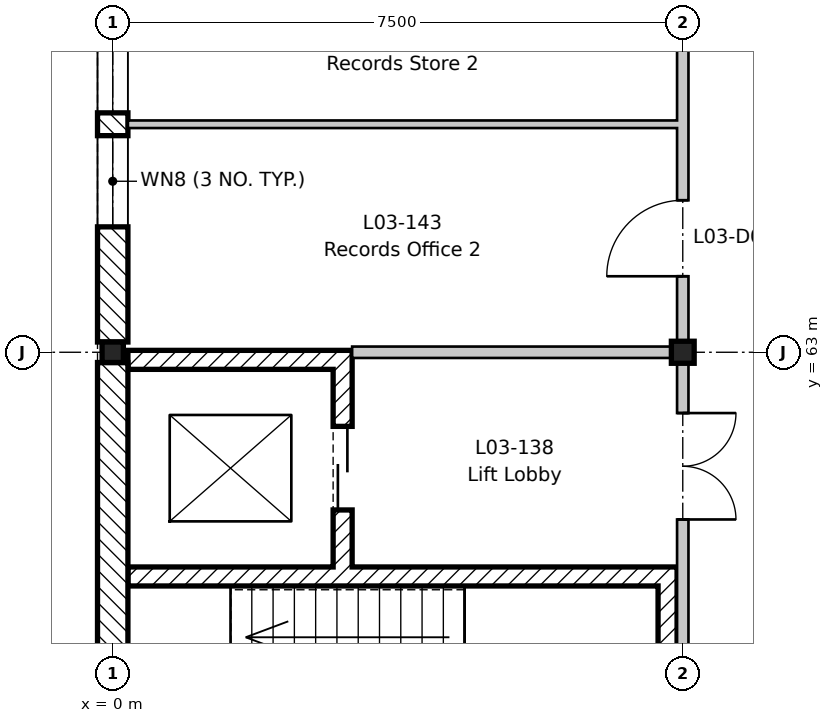
"""IFC4 building model, lengths in metres.
Left out: names, types, materials, properties, quantities, classifications, styles, units other than length and angle.
Written with IfcOpenShell. Run it as: python <this file> out.ifc"""

import sys

from ifc_helpers import new_model, si_unit, direction, frame, frame_2d, origin, origin_2d, place, context, subcontext, project, spatial, rectangle, i_section, extrude, element, fill, save


model = new_model("IFC4")
c1 = context("Model", 3, precision=1e-05, world=origin(), true_north=direction((0.0, 1.0)))
c2 = subcontext(c1, "Body", "Model", "MODEL_VIEW")
j1 = project(units=[si_unit("LENGTHUNIT", "METRE"), si_unit("PLANEANGLEUNIT", "RADIAN")], contexts=[c1])
p1 = place(None, origin())
s1 = spatial("IfcSite", under=j1, at=p1, CompositionType="ELEMENT")
p2 = place(p1, origin())
s2 = spatial("IfcBuilding", under=s1, at=p2, CompositionType="ELEMENT")
p3 = place(p2, frame((0.0, 0.0, 14.4)))
s3 = spatial("IfcBuildingStorey", under=s2, at=p3, CompositionType="ELEMENT", Elevation=14.4)
p4 = place(p3, frame((0.0, 63.0, -0.2), z_axis=(0.0, 0.0, 1.0), x_axis=(1.0, 0.0, 0.0)))
e1 = element("IfcColumn", 1, at=p4, inside=s3, PredefinedType="COLUMN", context=c2, shape_type="SweptSolid", body=[
    extrude(i_section(OverallWidth=0.28, OverallDepth=0.27, WebThickness=0.008, FlangeThickness=0.013, FilletRadius=0.024, at=origin_2d()), origin(), (0.0, 0.0, 1.0), 4.2),
])
p5 = place(p3, frame((7.5, 63.0, -0.2), z_axis=(0.0, 0.0, 1.0), x_axis=(1.0, 0.0, 0.0)))
e2 = element("IfcColumn", 2, at=p5, inside=s3, PredefinedType="COLUMN", context=c2, shape_type="SweptSolid", body=[
    extrude(i_section(OverallWidth=0.3, OverallDepth=0.29, WebThickness=0.009, FlangeThickness=0.014, FilletRadius=0.027, at=origin_2d()), origin(), (0.0, 0.0, 1.0), 4.2),
])
p6 = place(p3, frame((0.2, 60.05, 0.0), z_axis=(0.0, 0.0, 1.0), x_axis=(1.0, 0.0, 0.0)))
e3 = element("IfcWall", 3, at=p6, inside=s3, PredefinedType="SHEAR", context=c2, shape_type="SweptSolid", body=[
    extrude(rectangle(XDim=7.225, YDim=0.25, at=frame_2d((3.613, 0.0))), origin(), (0.0, 0.0, 1.0), 4.0),
])
p7 = place(p3, frame((7.3, 57.075, 0.0), z_axis=(0.0, 0.0, 1.0), x_axis=(0.0, 1.0, 0.0)))
e4 = element("IfcWall", 4, at=p7, inside=s3, PredefinedType="SHEAR", context=c2, shape_type="SweptSolid", body=[
    extrude(rectangle(XDim=2.85, YDim=0.25, at=frame_2d((1.425, 0.0))), origin(), (0.0, 0.0, 1.0), 4.0),
])
p8 = place(p3, frame((3.025, 60.175, 0.0), z_axis=(0.0, 0.0, 1.0), x_axis=(0.0, 1.0, 0.0)))
e5 = element("IfcWall", 5, at=p8, inside=s3, PredefinedType="SHEAR", context=c2, shape_type="SweptSolid", body=[
    extrude(rectangle(XDim=2.6, YDim=0.25, at=frame_2d((1.3, 0.0))), origin(), (0.0, 0.0, 1.0), 4.0),
])
p9 = place(p8, frame((0.75, 0.0, 0.0)))
e6 = element("IfcOpeningElement", 6, at=p9, cuts=e5, PredefinedType="OPENING", context=c2, shape_type="SweptSolid", body=[
    extrude(rectangle(XDim=1.1, YDim=2.1, at=frame_2d((0.55, 1.05))), frame((0.0, 0.135, 0.0), z_axis=(0.0, -1.0, 0.0), x_axis=(1.0, 0.0, 0.0)), (0.0, 0.0, 1.0), 0.27),
])
p10 = place(p3, frame((0.2, 62.9, 0.0), z_axis=(0.0, 0.0, 1.0), x_axis=(1.0, 0.0, 0.0)))
e7 = element("IfcWall", 7, at=p10, inside=s3, PredefinedType="SHEAR", context=c2, shape_type="SweptSolid", body=[
    extrude(rectangle(XDim=2.95, YDim=0.25, at=frame_2d((1.475, 0.0))), origin(), (0.0, 0.0, 1.0), 4.0),
])
p11 = place(p3, frame((0.0, 54.135, 0.0), z_axis=(0.0, 0.0, 1.0), x_axis=(0.0, 1.0, 0.0)))
e8 = element("IfcWall", 8, at=p11, inside=s3, PredefinedType="STANDARD", context=c2, shape_type="SweptSolid", body=[
    extrude(rectangle(XDim=8.73, YDim=0.4, at=frame_2d((4.365, 0.0))), origin(), (0.0, 0.0, 1.0), 3.6),
])
p12 = place(p3, frame((0.0, 63.135, 0.0), z_axis=(0.0, 0.0, 1.0), x_axis=(0.0, 1.0, 0.0)))
e9 = element("IfcWall", 9, at=p12, inside=s3, PredefinedType="STANDARD", context=c2, shape_type="SweptSolid", body=[
    extrude(rectangle(XDim=7.23, YDim=0.4, at=frame_2d((3.615, 0.0))), origin(), (0.0, 0.0, 1.0), 3.6),
])
p13 = place(p12, frame((1.515, 0.0, 0.6)))
e10 = element("IfcOpeningElement", 10, at=p13, cuts=e9, PredefinedType="OPENING", context=c2, shape_type="SweptSolid", body=[
    extrude(rectangle(XDim=1.2, YDim=2.7, at=frame_2d((0.6, 1.35))), frame((0.0, 0.21, 0.0), z_axis=(0.0, -1.0, 0.0), x_axis=(1.0, 0.0, 0.0)), (0.0, 0.0, 1.0), 0.42),
])
p14 = place(p12, frame((3.015, 0.0, 0.6)))
e11 = element("IfcOpeningElement", 11, at=p14, cuts=e9, PredefinedType="OPENING", context=c2, shape_type="SweptSolid", body=[
    extrude(rectangle(XDim=1.2, YDim=2.7, at=frame_2d((0.6, 1.35))), frame((0.0, 0.21, 0.0), z_axis=(0.0, -1.0, 0.0), x_axis=(1.0, 0.0, 0.0)), (0.0, 0.0, 1.0), 0.42),
])
p15 = place(p12, frame((4.515, 0.0, 0.6)))
e12 = element("IfcOpeningElement", 12, at=p15, cuts=e9, PredefinedType="OPENING", context=c2, shape_type="SweptSolid", body=[
    extrude(rectangle(XDim=1.2, YDim=2.7, at=frame_2d((0.6, 1.35))), frame((0.0, 0.21, 0.0), z_axis=(0.0, -1.0, 0.0), x_axis=(1.0, 0.0, 0.0)), (0.0, 0.0, 1.0), 0.42),
])
p16 = place(p3, frame((7.5, -8.8, 0.0), z_axis=(0.0, 0.0, 1.0), x_axis=(0.0, 1.0, 0.0)))
e13 = element("IfcWall", 13, at=p16, inside=s3, PredefinedType="PARTITIONING", context=c2, shape_type="SweptSolid", body=[
    extrude(rectangle(XDim=79.3, YDim=0.15, at=frame_2d((39.65, 0.0))), origin(), (0.0, 0.0, 1.0), 3.48),
])
p17 = place(p16, frame((18.8, 0.0, 0.0)))
e14 = element("IfcOpeningElement", 14, at=p17, cuts=e13, PredefinedType="OPENING", context=c2, shape_type="SweptSolid", body=[
    extrude(rectangle(XDim=1.0, YDim=2.1, at=frame_2d((0.5, 1.05))), frame((0.0, 0.085, 0.0), z_axis=(0.0, -1.0, 0.0), x_axis=(1.0, 0.0, 0.0)), (0.0, 0.0, 1.0), 0.17),
])
p18 = place(p16, frame((23.3, 0.0, 0.0)))
e15 = element("IfcOpeningElement", 15, at=p18, cuts=e13, PredefinedType="OPENING", context=c2, shape_type="SweptSolid", body=[
    extrude(rectangle(XDim=1.0, YDim=2.1, at=frame_2d((0.5, 1.05))), frame((0.0, 0.085, 0.0), z_axis=(0.0, -1.0, 0.0), x_axis=(1.0, 0.0, 0.0)), (0.0, 0.0, 1.0), 0.17),
])
p19 = place(p16, frame((27.8, 0.0, 0.0)))
e16 = element("IfcOpeningElement", 16, at=p19, cuts=e13, PredefinedType="OPENING", context=c2, shape_type="SweptSolid", body=[
    extrude(rectangle(XDim=1.0, YDim=2.1, at=frame_2d((0.5, 1.05))), frame((0.0, 0.085, 0.0), z_axis=(0.0, -1.0, 0.0), x_axis=(1.0, 0.0, 0.0)), (0.0, 0.0, 1.0), 0.17),
])
p20 = place(p16, frame((30.8, 0.0, 0.0)))
e17 = element("IfcOpeningElement", 17, at=p20, cuts=e13, PredefinedType="OPENING", context=c2, shape_type="SweptSolid", body=[
    extrude(rectangle(XDim=1.0, YDim=2.1, at=frame_2d((0.5, 1.05))), frame((0.0, 0.085, 0.0), z_axis=(0.0, -1.0, 0.0), x_axis=(1.0, 0.0, 0.0)), (0.0, 0.0, 1.0), 0.17),
])
p21 = place(p16, frame((33.8, 0.0, 0.0)))
e18 = element("IfcOpeningElement", 18, at=p21, cuts=e13, PredefinedType="OPENING", context=c2, shape_type="SweptSolid", body=[
    extrude(rectangle(XDim=1.0, YDim=2.1, at=frame_2d((0.5, 1.05))), frame((0.0, 0.085, 0.0), z_axis=(0.0, -1.0, 0.0), x_axis=(1.0, 0.0, 0.0)), (0.0, 0.0, 1.0), 0.17),
])
p22 = place(p16, frame((47.3, 0.0, 0.0)))
e19 = element("IfcOpeningElement", 19, at=p22, cuts=e13, PredefinedType="OPENING", context=c2, shape_type="SweptSolid", body=[
    extrude(rectangle(XDim=1.0, YDim=2.1, at=frame_2d((0.5, 1.05))), frame((0.0, 0.085, 0.0), z_axis=(0.0, -1.0, 0.0), x_axis=(1.0, 0.0, 0.0)), (0.0, 0.0, 1.0), 0.17),
])
p23 = place(p16, frame((51.8, 0.0, 0.0)))
e20 = element("IfcOpeningElement", 20, at=p23, cuts=e13, PredefinedType="OPENING", context=c2, shape_type="SweptSolid", body=[
    extrude(rectangle(XDim=1.0, YDim=2.1, at=frame_2d((0.5, 1.05))), frame((0.0, 0.085, 0.0), z_axis=(0.0, -1.0, 0.0), x_axis=(1.0, 0.0, 0.0)), (0.0, 0.0, 1.0), 0.17),
])
p24 = place(p16, frame((54.8, 0.0, 0.0)))
e21 = element("IfcOpeningElement", 21, at=p24, cuts=e13, PredefinedType="OPENING", context=c2, shape_type="SweptSolid", body=[
    extrude(rectangle(XDim=1.0, YDim=2.1, at=frame_2d((0.5, 1.05))), frame((0.0, 0.085, 0.0), z_axis=(0.0, -1.0, 0.0), x_axis=(1.0, 0.0, 0.0)), (0.0, 0.0, 1.0), 0.17),
])
p25 = place(p16, frame((57.8, 0.0, 0.0)))
e22 = element("IfcOpeningElement", 22, at=p25, cuts=e13, PredefinedType="OPENING", context=c2, shape_type="SweptSolid", body=[
    extrude(rectangle(XDim=1.0, YDim=2.1, at=frame_2d((0.5, 1.05))), frame((0.0, 0.085, 0.0), z_axis=(0.0, -1.0, 0.0), x_axis=(1.0, 0.0, 0.0)), (0.0, 0.0, 1.0), 0.17),
])
p26 = place(p16, frame((60.8, 0.0, 0.0)))
e23 = element("IfcOpeningElement", 23, at=p26, cuts=e13, PredefinedType="OPENING", context=c2, shape_type="SweptSolid", body=[
    extrude(rectangle(XDim=1.0, YDim=2.1, at=frame_2d((0.5, 1.05))), frame((0.0, 0.085, 0.0), z_axis=(0.0, -1.0, 0.0), x_axis=(1.0, 0.0, 0.0)), (0.0, 0.0, 1.0), 0.17),
])
p27 = place(p16, frame((12.6, 0.0, 0.0)))
e24 = element("IfcOpeningElement", 24, at=p27, cuts=e13, PredefinedType="OPENING", context=c2, shape_type="SweptSolid", body=[
    extrude(rectangle(XDim=1.4, YDim=2.1, at=frame_2d((0.7, 1.05))), frame((0.0, 0.085, 0.0), z_axis=(0.0, -1.0, 0.0), x_axis=(1.0, 0.0, 0.0)), (0.0, 0.0, 1.0), 0.17),
])
p28 = place(p16, frame((3.6, 0.0, 0.0)))
e25 = element("IfcOpeningElement", 25, at=p28, cuts=e13, PredefinedType="OPENING", context=c2, shape_type="SweptSolid", body=[
    extrude(rectangle(XDim=1.4, YDim=2.1, at=frame_2d((0.7, 1.05))), frame((0.0, 0.085, 0.0), z_axis=(0.0, -1.0, 0.0), x_axis=(1.0, 0.0, 0.0)), (0.0, 0.0, 1.0), 0.17),
])
p29 = place(p16, frame((63.55, 0.0, 0.0)))
e26 = element("IfcOpeningElement", 26, at=p29, cuts=e13, PredefinedType="OPENING", context=c2, shape_type="SweptSolid", body=[
    extrude(rectangle(XDim=1.4, YDim=2.1, at=frame_2d((0.7, 1.05))), frame((0.0, 0.085, 0.0), z_axis=(0.0, -1.0, 0.0), x_axis=(1.0, 0.0, 0.0)), (0.0, 0.0, 1.0), 0.17),
])
p30 = place(p16, frame((69.6, 0.0, 0.0)))
e27 = element("IfcOpeningElement", 27, at=p30, cuts=e13, PredefinedType="OPENING", context=c2, shape_type="SweptSolid", body=[
    extrude(rectangle(XDim=1.4, YDim=2.1, at=frame_2d((0.7, 1.05))), frame((0.0, 0.085, 0.0), z_axis=(0.0, -1.0, 0.0), x_axis=(1.0, 0.0, 0.0)), (0.0, 0.0, 1.0), 0.17),
])
p31 = place(p16, frame((42.85, 0.0, 0.0)))
e28 = element("IfcOpeningElement", 28, at=p31, cuts=e13, PredefinedType="OPENING", context=c2, shape_type="SweptSolid", body=[
    extrude(rectangle(XDim=1.0, YDim=2.1, at=frame_2d((0.5, 1.05))), frame((0.0, 0.085, 0.0), z_axis=(0.0, -1.0, 0.0), x_axis=(1.0, 0.0, 0.0)), (0.0, 0.0, 1.0), 0.17),
])
p32 = place(p16, frame((36.55, 0.0, 0.0)))
e29 = element("IfcOpeningElement", 29, at=p32, cuts=e13, PredefinedType="OPENING", context=c2, shape_type="SweptSolid", body=[
    extrude(rectangle(XDim=1.4, YDim=2.1, at=frame_2d((0.7, 1.05))), frame((0.0, 0.085, 0.0), z_axis=(0.0, -1.0, 0.0), x_axis=(1.0, 0.0, 0.0)), (0.0, 0.0, 1.0), 0.17),
])
p33 = place(p16, frame((72.8, 0.0, 0.0)))
e30 = element("IfcOpeningElement", 30, at=p33, cuts=e13, PredefinedType="OPENING", context=c2, shape_type="SweptSolid", body=[
    extrude(rectangle(XDim=1.0, YDim=2.1, at=frame_2d((0.5, 1.05))), frame((0.0, 0.085, 0.0), z_axis=(0.0, -1.0, 0.0), x_axis=(1.0, 0.0, 0.0)), (0.0, 0.0, 1.0), 0.17),
])
p34 = place(p3, frame((3.15, 63.0, 0.0), z_axis=(0.0, 0.0, 1.0), x_axis=(1.0, 0.0, 0.0)))
e31 = element("IfcWall", 31, at=p34, inside=s3, PredefinedType="PARTITIONING", context=c2, shape_type="SweptSolid", body=[
    extrude(rectangle(XDim=4.275, YDim=0.15, at=frame_2d((2.138, 0.0))), origin(), (0.0, 0.0, 1.0), 3.65),
])
p35 = place(p3, frame((0.2, 66.0, 0.0), z_axis=(0.0, 0.0, 1.0), x_axis=(1.0, 0.0, 0.0)))
e32 = element("IfcWall", 32, at=p35, inside=s3, PredefinedType="PARTITIONING", context=c2, shape_type="SweptSolid", body=[
    extrude(rectangle(XDim=7.225, YDim=0.1, at=frame_2d((3.613, 0.0))), origin(), (0.0, 0.0, 1.0), 4.0),
])
p36 = place(p13, origin())
e33 = element("IfcWindow", 33, at=p36, inside=s3, PartitioningType="SINGLE_PANEL", PredefinedType="WINDOW", context=c2, shape_type="SweptSolid", body=[
    extrude(rectangle(XDim=1.2, YDim=2.7, at=frame_2d((0.6, 1.35))), frame((0.0, 0.03, 0.0), z_axis=(0.0, -1.0, 0.0), x_axis=(1.0, 0.0, 0.0)), (0.0, 0.0, 1.0), 0.06),
])
fill(e10, e33)
p37 = place(p14, origin())
e34 = element("IfcWindow", 34, at=p37, inside=s3, PartitioningType="SINGLE_PANEL", PredefinedType="WINDOW", context=c2, shape_type="SweptSolid", body=[
    extrude(rectangle(XDim=1.2, YDim=2.7, at=frame_2d((0.6, 1.35))), frame((0.0, 0.03, 0.0), z_axis=(0.0, -1.0, 0.0), x_axis=(1.0, 0.0, 0.0)), (0.0, 0.0, 1.0), 0.06),
])
fill(e11, e34)
p38 = place(p30, frame((1.4, 0.0, 0.0), z_axis=(0.0, 0.0, 1.0), x_axis=(-1.0, 0.0, 0.0)))
e35 = element("IfcDoor", 35, at=p38, inside=s3, OperationType="DOUBLE_DOOR_SINGLE_SWING", PredefinedType="DOOR", context=c2, shape_type="SweptSolid", body=[
    extrude(rectangle(XDim=1.4, YDim=2.1, at=frame_2d((0.7, 1.05))), frame((0.0, 0.025, 0.0), z_axis=(0.0, -1.0, 0.0), x_axis=(1.0, 0.0, 0.0)), (0.0, 0.0, 1.0), 0.05),
])
fill(e27, e35)
p39 = place(p33, origin())
e36 = element("IfcDoor", 36, at=p39, inside=s3, OperationType="SINGLE_SWING_LEFT", PredefinedType="DOOR", context=c2, shape_type="SweptSolid", body=[
    extrude(rectangle(XDim=1.0, YDim=2.1, at=frame_2d((0.5, 1.05))), frame((0.0, 0.025, 0.0), z_axis=(0.0, -1.0, 0.0), x_axis=(1.0, 0.0, 0.0)), (0.0, 0.0, 1.0), 0.05),
])
fill(e30, e36)
p40 = place(p9, origin())
e37 = element("IfcDoor", 37, at=p40, inside=s3, OperationType="SLIDING_TO_LEFT", PredefinedType="DOOR", context=c2, shape_type="SweptSolid", body=[
    extrude(rectangle(XDim=1.1, YDim=2.1, at=frame_2d((0.55, 1.05))), frame((0.0, 0.025, 0.0), z_axis=(0.0, -1.0, 0.0), x_axis=(1.0, 0.0, 0.0)), (0.0, 0.0, 1.0), 0.05),
])
fill(e6, e37)
save(model, sys.argv[1])
